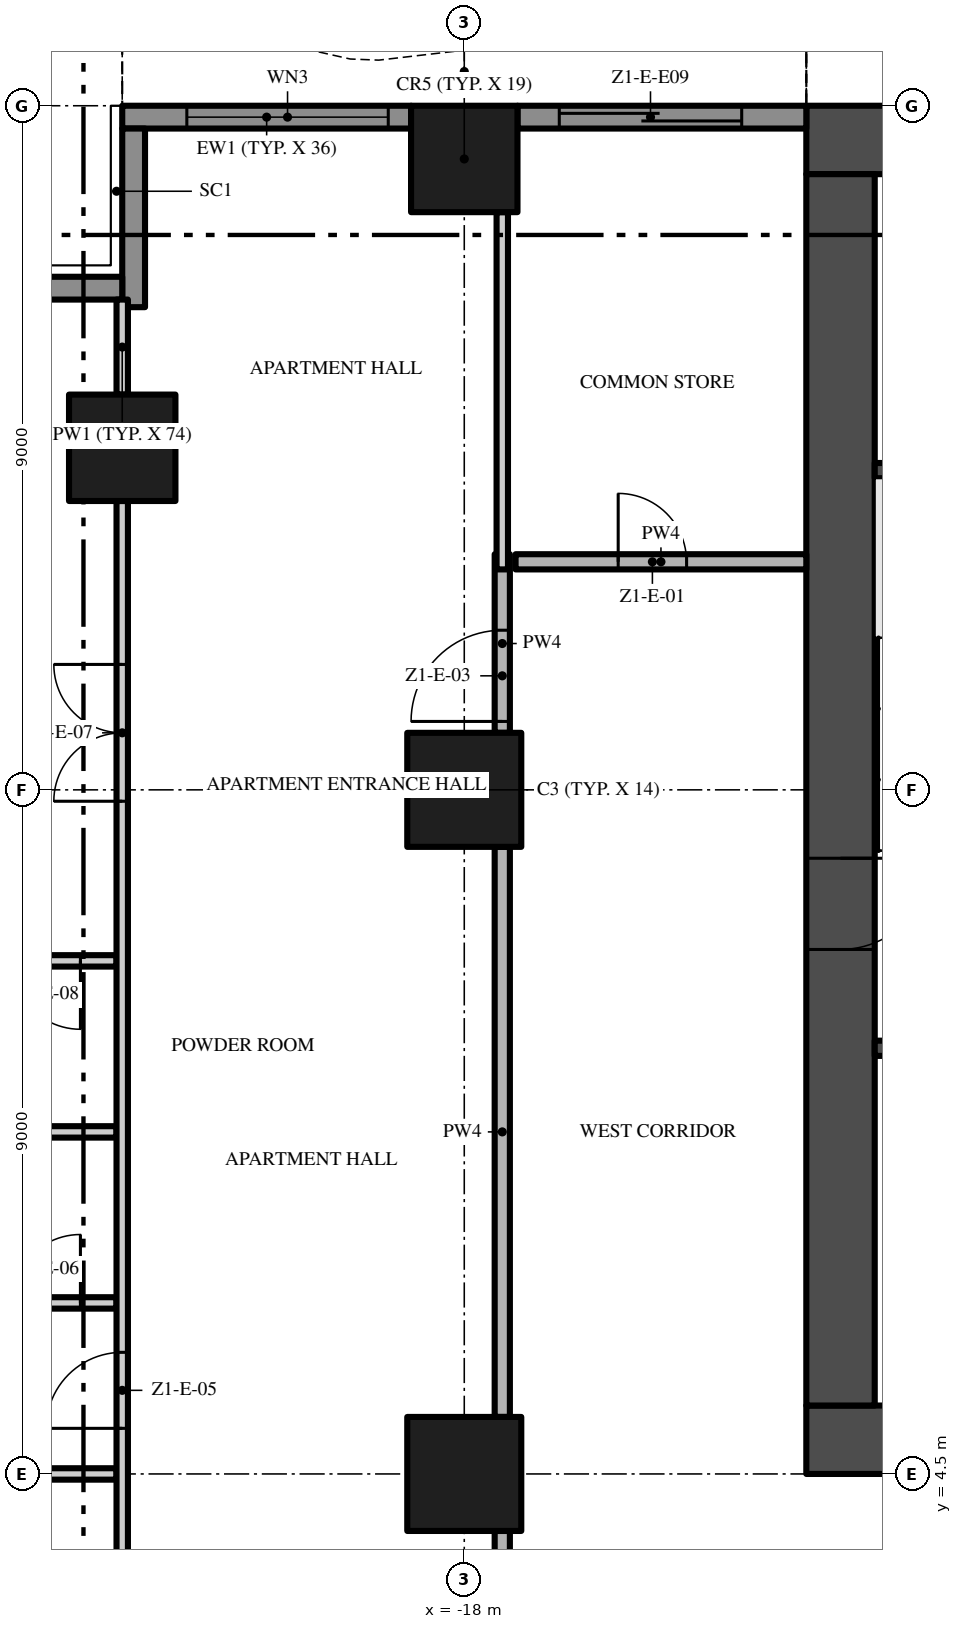
"""IFC4 building model, lengths in metres.
Left out: names, types, materials, properties, quantities, classifications, styles, units other than length and angle.
Written with IfcOpenShell. Run it as: python <this file> out.ifc"""

import sys

from ifc_helpers import new_model, si_unit, direction, frame, frame_2d, origin, origin_2d, place, context, subcontext, project, spatial, polyline, rectangle, outline, extrude, element, fill, save


model = new_model("IFC4")
c1 = context("Model", 3, precision=1e-05, world=origin(), true_north=direction((0.0, 1.0)))
c2 = subcontext(c1, "Body", "Model", "MODEL_VIEW")
j1 = project(units=[si_unit("LENGTHUNIT", "METRE"), si_unit("PLANEANGLEUNIT", "RADIAN")], contexts=[c1])
p1 = place(None, origin())
s1 = spatial("IfcSite", under=j1, at=p1, CompositionType="ELEMENT")
p2 = place(p1, origin())
s2 = spatial("IfcBuilding", under=s1, at=p2, CompositionType="ELEMENT")
p3 = place(p2, frame((0.0, 0.0, 56.8)))
s3 = spatial("IfcBuildingStorey", under=s2, at=p3, CompositionType="ELEMENT", Elevation=56.8)
p4 = place(p3, frame((-13.5, 4.95, -0.3), z_axis=(0.0, 0.0, 1.0), x_axis=(1.0, 0.0, 0.0)))
e1 = element("IfcWall", 1, at=p4, inside=s3, PredefinedType="SHEAR", context=c2, shape_type="SweptSolid", body=[
    extrude(rectangle(XDim=27.0, YDim=0.9, at=frame_2d((13.5, 0.0))), origin(), (0.0, 0.0, 1.0), 3.8),
])
p5 = place(p4, frame((12.0, 0.0, 0.3)))
e2 = element("IfcOpeningElement", 2, at=p5, cuts=e1, PredefinedType="OPENING", context=c2, shape_type="SweptSolid", body=[
    extrude(rectangle(XDim=3.0, YDim=2.4, at=frame_2d((1.5, 1.2))), frame((0.0, 0.46, 0.0), z_axis=(0.0, -1.0, 0.0), x_axis=(1.0, 0.0, 0.0)), (0.0, 0.0, 1.0), 0.92),
])
p6 = place(p4, frame((4.9, 0.0, 0.3)))
e3 = element("IfcOpeningElement", 3, at=p6, cuts=e1, PredefinedType="OPENING", context=c2, shape_type="SweptSolid", body=[
    extrude(rectangle(XDim=1.2, YDim=2.2, at=frame_2d((0.6, 1.1))), frame((0.0, 0.46, 0.0), z_axis=(0.0, -1.0, 0.0), x_axis=(1.0, 0.0, 0.0)), (0.0, 0.0, 1.0), 0.92),
])
p7 = place(p4, frame((20.75, 0.0, 0.3)))
e4 = element("IfcOpeningElement", 4, at=p7, cuts=e1, PredefinedType="OPENING", context=c2, shape_type="SweptSolid", body=[
    extrude(rectangle(XDim=1.5, YDim=2.2, at=frame_2d((0.75, 1.1))), frame((0.0, 0.46, 0.0), z_axis=(0.0, -1.0, 0.0), x_axis=(1.0, 0.0, 0.0)), (0.0, 0.0, 1.0), 0.92),
])
p8 = place(p4, frame((17.4, 0.0, 0.3)))
e5 = element("IfcOpeningElement", 5, at=p8, cuts=e1, PredefinedType="OPENING", context=c2, shape_type="SweptSolid", body=[
    extrude(rectangle(XDim=1.2, YDim=2.2, at=frame_2d((0.6, 1.1))), frame((0.0, 0.46, 0.0), z_axis=(0.0, -1.0, 0.0), x_axis=(1.0, 0.0, 0.0)), (0.0, 0.0, 1.0), 0.92),
])
p9 = place(p3, frame((13.5, 22.05, -0.3), z_axis=(0.0, 0.0, 1.0), x_axis=(-1.0, 0.0, 0.0)))
e6 = element("IfcWall", 6, at=p9, inside=s3, PredefinedType="SHEAR", context=c2, shape_type="SweptSolid", body=[
    extrude(rectangle(XDim=27.0, YDim=0.9, at=frame_2d((13.5, 0.0))), origin(), (0.0, 0.0, 1.0), 3.8),
])
p10 = place(p3, frame((-13.05, 21.6, -0.3), z_axis=(0.0, 0.0, 1.0), x_axis=(0.0, -1.0, 0.0)))
e7 = element("IfcWall", 7, at=p10, inside=s3, PredefinedType="SHEAR", context=c2, shape_type="SweptSolid", body=[
    extrude(rectangle(XDim=16.2, YDim=0.9, at=frame_2d((8.1, 0.0))), origin(), (0.0, 0.0, 1.0), 3.8),
])
p11 = place(p10, frame((9.0, 0.0, 0.3)))
e8 = element("IfcOpeningElement", 8, at=p11, cuts=e7, PredefinedType="OPENING", context=c2, shape_type="SweptSolid", body=[
    extrude(rectangle(XDim=1.2, YDim=2.2, at=frame_2d((0.6, 1.1))), frame((0.0, 0.46, 0.0), z_axis=(0.0, -1.0, 0.0), x_axis=(1.0, 0.0, 0.0)), (0.0, 0.0, 1.0), 0.92),
])
p12 = place(p3, frame((-18.0, 13.5, 0.0), z_axis=(0.0, 0.0, 1.0), x_axis=(1.0, 0.0, 0.0)))
e9 = element("IfcColumn", 9, at=p12, inside=s3, PredefinedType="COLUMN", context=c2, shape_type="SweptSolid", body=[
    extrude(rectangle(XDim=1.5, YDim=1.5, at=origin_2d()), origin(), (0.0, 0.0, 1.0), 3.5),
])
p13 = place(p3, frame((-18.0, 21.8, 0.0), z_axis=(0.0, 0.0, 1.0), x_axis=(1.0, 0.0, 0.0)))
e10 = element("IfcColumn", 10, at=p13, inside=s3, PredefinedType="COLUMN", context=c2, shape_type="SweptSolid", body=[
    extrude(rectangle(XDim=1.4, YDim=1.4, at=origin_2d()), origin(), (0.0, 0.0, 1.0), 3.5),
])
p14 = place(p3, frame((-18.0, 4.5, 0.0), z_axis=(0.0, 0.0, 1.0), x_axis=(1.0, 0.0, 0.0)))
e11 = element("IfcColumn", 11, at=p14, inside=s3, PredefinedType="COLUMN", context=c2, shape_type="SweptSolid", body=[
    extrude(rectangle(XDim=1.5, YDim=1.5, at=origin_2d()), origin(), (0.0, 0.0, 1.0), 3.5),
])
p15 = place(p3, frame((-22.5, 18.0, 0.0), z_axis=(0.0, 0.0, 1.0), x_axis=(1.0, 0.0, 0.0)))
e12 = element("IfcColumn", 12, at=p15, inside=s3, PredefinedType="COLUMN", context=c2, shape_type="SweptSolid", body=[
    extrude(rectangle(XDim=1.4, YDim=1.4, at=origin_2d()), origin(), (0.0, 0.0, 1.0), 3.5),
])
p16 = place(p3, frame((-17.3, 22.35, 0.0), z_axis=(0.0, 0.0, 1.0), x_axis=(1.0, 0.0, 0.0)))
e13 = element("IfcWall", 13, at=p16, inside=s3, PredefinedType="SOLIDWALL", context=c2, shape_type="SweptSolid", body=[
    extrude(rectangle(XDim=3.8, YDim=0.3, at=frame_2d((1.9, 0.0))), origin(), (0.0, 0.0, 1.0), 3.5),
])
p17 = place(p16, frame((0.55, 0.0, 0.0)))
e14 = element("IfcOpeningElement", 14, at=p17, cuts=e13, PredefinedType="OPENING", context=c2, shape_type="SweptSolid", body=[
    extrude(rectangle(XDim=2.4, YDim=2.4, at=frame_2d((1.2, 1.2))), frame((0.0, 0.16, 0.0), z_axis=(0.0, -1.0, 0.0), x_axis=(1.0, 0.0, 0.0)), (0.0, 0.0, 1.0), 0.32),
])
p18 = place(p3, frame((-22.5, 22.35, 0.0), z_axis=(0.0, 0.0, 1.0), x_axis=(1.0, 0.0, 0.0)))
e15 = element("IfcWall", 15, at=p18, inside=s3, PredefinedType="SOLIDWALL", context=c2, shape_type="SweptSolid", body=[
    extrude(rectangle(XDim=3.8, YDim=0.3, at=frame_2d((1.9, 0.0))), origin(), (0.0, 0.0, 1.0), 3.5),
])
p19 = place(p18, frame((0.85, 0.0, 0.45)))
e16 = element("IfcOpeningElement", 16, at=p19, cuts=e15, PredefinedType="OPENING", context=c2, shape_type="SweptSolid", body=[
    extrude(rectangle(XDim=2.65, YDim=2.65, at=frame_2d((1.325, 1.325))), frame((0.0, 0.16, 0.0), z_axis=(0.0, -1.0, 0.0), x_axis=(1.0, 0.0, 0.0)), (0.0, 0.0, 1.0), 0.32),
])
p20 = place(p3, frame((-22.35, 19.85, 0.0), z_axis=(0.0, 0.0, 1.0), x_axis=(0.0, 1.0, 0.0)))
e17 = element("IfcWall", 17, at=p20, inside=s3, PredefinedType="SOLIDWALL", context=c2, shape_type="SweptSolid", body=[
    extrude(rectangle(XDim=2.35, YDim=0.3, at=frame_2d((1.175, 0.0))), origin(), (0.0, 0.0, 1.0), 3.5),
])
p21 = place(p3, frame((-24.75, 20.1, 0.0), z_axis=(0.0, 0.0, 1.0), x_axis=(1.0, 0.0, 0.0)))
e18 = element("IfcWall", 18, at=p21, inside=s3, PredefinedType="SOLIDWALL", context=c2, shape_type="SweptSolid", body=[
    extrude(rectangle(XDim=2.25, YDim=0.3, at=frame_2d((1.125, 0.0))), origin(), (0.0, 0.0, 1.0), 3.5),
])
p22 = place(p3, origin())
e19 = element("IfcWall", 19, at=p22, inside=s3, PredefinedType="USERDEFINED", context=c2, shape_type="SweptSolid", body=[
    extrude(outline(polyline([(-13.5, 25.149), (-15.0, 24.488), (-16.5, 23.755), (-18.0, 23.231), (-19.125, 23.1), (-19.5, 23.115), (-21.0, 23.451), (-22.5, 24.112), (-22.601, 23.883), (-21.079, 23.213), (-19.533, 22.866), (-19.115, 22.849), (-17.944, 22.986), (-16.404, 23.524), (-14.895, 24.261), (-13.399, 24.92), (-13.5, 25.149)])), origin(), (0.0, 0.0, 1.0), 0.9),
])
for number, where, z_axis, x_axis in (
    (20, (-12.6, 10.1, 0.0), (0.0, 0.0, 1.0), (1.0, 0.0, 0.0)),
    (21, (-12.6, 17.7, 0.0), (0.0, 0.0, 1.0), (1.0, 0.0, 0.0)),
):
    element("IfcWall", number, at=place(p3, frame(where, z_axis=z_axis, x_axis=x_axis)), inside=s3, PredefinedType="SHEAR", context=c2, shape_type="SweptSolid", body=[
        extrude(rectangle(XDim=2.95, YDim=0.2, at=frame_2d((1.475, 0.0))), origin(), (0.0, 0.0, 1.0), 3.5),
    ])
p23 = place(p3, frame((-25.6, 4.5, 0.0), z_axis=(0.0, 0.0, 1.0), x_axis=(1.0, 0.0, 0.0)))
e22 = element("IfcWall", 22, at=p23, inside=s3, PredefinedType="PARTITIONING", context=c2, shape_type="SweptSolid", body=[
    extrude(rectangle(XDim=3.025, YDim=0.15, at=frame_2d((1.512, 0.0))), origin(), (0.0, 0.0, 1.0), 3.5),
])
p24 = place(p3, frame((-24.45, 6.75, 0.0), z_axis=(0.0, 0.0, 1.0), x_axis=(1.0, 0.0, 0.0)))
e23 = element("IfcWall", 23, at=p24, inside=s3, PredefinedType="PARTITIONING", context=c2, shape_type="SweptSolid", body=[
    extrude(rectangle(XDim=1.875, YDim=0.15, at=frame_2d((0.938, 0.0))), origin(), (0.0, 0.0, 1.0), 3.5),
])
p25 = place(p24, frame((0.5, 0.0, 0.0)))
e24 = element("IfcOpeningElement", 24, at=p25, cuts=e23, PredefinedType="OPENING", context=c2, shape_type="SweptSolid", body=[
    extrude(rectangle(XDim=0.9, YDim=2.1, at=frame_2d((0.45, 1.05))), frame((0.0, 0.085, 0.0), z_axis=(0.0, -1.0, 0.0), x_axis=(1.0, 0.0, 0.0)), (0.0, 0.0, 1.0), 0.17),
])
p26 = place(p3, frame((-24.45, 9.0, 0.0), z_axis=(0.0, 0.0, 1.0), x_axis=(1.0, 0.0, 0.0)))
e25 = element("IfcWall", 25, at=p26, inside=s3, PredefinedType="PARTITIONING", context=c2, shape_type="SweptSolid", body=[
    extrude(rectangle(XDim=1.875, YDim=0.15, at=frame_2d((0.938, 0.0))), origin(), (0.0, 0.0, 1.0), 3.5),
])
p27 = place(p3, frame((-22.575, 11.25, 0.0), z_axis=(0.0, 0.0, 1.0), x_axis=(-1.0, 0.0, 0.0)))
e26 = element("IfcWall", 26, at=p27, inside=s3, PredefinedType="PARTITIONING", context=c2, shape_type="SweptSolid", body=[
    extrude(rectangle(XDim=1.875, YDim=0.15, at=frame_2d((0.938, 0.0))), origin(), (0.0, 0.0, 1.0), 3.5),
])
p28 = place(p27, frame((0.475, 0.0, 0.0)))
e27 = element("IfcOpeningElement", 27, at=p28, cuts=e26, PredefinedType="OPENING", context=c2, shape_type="SweptSolid", body=[
    extrude(rectangle(XDim=0.9, YDim=2.1, at=frame_2d((0.45, 1.05))), frame((0.0, 0.085, 0.0), z_axis=(0.0, -1.0, 0.0), x_axis=(1.0, 0.0, 0.0)), (0.0, 0.0, 1.0), 0.17),
])
p29 = place(p3, frame((-17.325, 16.5, 0.0), z_axis=(0.0, 0.0, 1.0), x_axis=(1.0, 0.0, 0.0)))
e28 = element("IfcWall", 28, at=p29, inside=s3, PredefinedType="PARTITIONING", context=c2, shape_type="SweptSolid", body=[
    extrude(rectangle(XDim=3.825, YDim=0.2, at=frame_2d((1.913, 0.0))), origin(), (0.0, 0.0, 1.0), 3.5),
])
p30 = place(p29, frame((1.35, 0.0, 0.0)))
e29 = element("IfcOpeningElement", 29, at=p30, cuts=e28, PredefinedType="OPENING", context=c2, shape_type="SweptSolid", body=[
    extrude(rectangle(XDim=0.9, YDim=2.1, at=frame_2d((0.45, 1.05))), frame((0.0, 0.11, 0.0), z_axis=(0.0, -1.0, 0.0), x_axis=(1.0, 0.0, 0.0)), (0.0, 0.0, 1.0), 0.22),
])
p31 = place(p3, frame((-22.5, 0.1, 0.0), z_axis=(0.0, 0.0, 1.0), x_axis=(0.0, 1.0, 0.0)))
e30 = element("IfcWall", 30, at=p31, inside=s3, PredefinedType="PARTITIONING", context=c2, shape_type="SweptSolid", body=[
    extrude(rectangle(XDim=17.2, YDim=0.15, at=frame_2d((8.6, 0.0))), origin(), (0.0, 0.0, 1.0), 3.5),
])
p32 = place(p31, frame((1.65, 0.0, 0.0)))
e31 = element("IfcOpeningElement", 31, at=p32, cuts=e30, PredefinedType="OPENING", context=c2, shape_type="SweptSolid", body=[
    extrude(rectangle(XDim=1.0, YDim=2.4, at=frame_2d((0.5, 1.2))), frame((0.0, 0.085, 0.0), z_axis=(0.0, -1.0, 0.0), x_axis=(1.0, 0.0, 0.0)), (0.0, 0.0, 1.0), 0.17),
])
p33 = place(p31, frame((5.0, 0.0, 0.0)))
e32 = element("IfcOpeningElement", 32, at=p33, cuts=e30, PredefinedType="OPENING", context=c2, shape_type="SweptSolid", body=[
    extrude(rectangle(XDim=1.0, YDim=2.4, at=frame_2d((0.5, 1.2))), frame((0.0, 0.085, 0.0), z_axis=(0.0, -1.0, 0.0), x_axis=(1.0, 0.0, 0.0)), (0.0, 0.0, 1.0), 0.17),
])
p34 = place(p31, frame((13.25, 0.0, 0.0)))
e33 = element("IfcOpeningElement", 33, at=p34, cuts=e30, PredefinedType="OPENING", context=c2, shape_type="SweptSolid", body=[
    extrude(rectangle(XDim=1.8, YDim=2.4, at=frame_2d((0.9, 1.2))), frame((0.0, 0.085, 0.0), z_axis=(0.0, -1.0, 0.0), x_axis=(1.0, 0.0, 0.0)), (0.0, 0.0, 1.0), 0.17),
])
p35 = place(p3, frame((-22.5, 18.7, 0.0), z_axis=(0.0, 0.0, 1.0), x_axis=(0.0, 1.0, 0.0)))
e34 = element("IfcWall", 34, at=p35, inside=s3, PredefinedType="PARTITIONING", context=c2, shape_type="SweptSolid", body=[
    extrude(rectangle(XDim=1.25, YDim=0.15, at=frame_2d((0.625, 0.0))), origin(), (0.0, 0.0, 1.0), 3.5),
])
p36 = place(p3, frame((-17.5, -0.2, 0.0), z_axis=(0.0, 0.0, 1.0), x_axis=(0.0, 1.0, 0.0)))
e35 = element("IfcWall", 35, at=p36, inside=s3, PredefinedType="PARTITIONING", context=c2, shape_type="SweptSolid", body=[
    extrude(rectangle(XDim=3.95, YDim=0.2, at=frame_2d((1.975, 0.0))), origin(), (0.0, 0.0, 1.0), 3.5),
])
p37 = place(p3, frame((-17.5, 5.25, 0.0), z_axis=(0.0, 0.0, 1.0), x_axis=(0.0, 1.0, 0.0)))
e36 = element("IfcWall", 36, at=p37, inside=s3, PredefinedType="PARTITIONING", context=c2, shape_type="SweptSolid", body=[
    extrude(rectangle(XDim=7.5, YDim=0.2, at=frame_2d((3.75, 0.0))), origin(), (0.0, 0.0, 1.0), 3.5),
])
p38 = place(p3, frame((-17.5, 14.25, 0.0), z_axis=(0.0, 0.0, 1.0), x_axis=(0.0, 1.0, 0.0)))
e37 = element("IfcWall", 37, at=p38, inside=s3, PredefinedType="PARTITIONING", context=c2, shape_type="SweptSolid", body=[
    extrude(rectangle(XDim=2.35, YDim=0.2, at=frame_2d((1.175, 0.0))), origin(), (0.0, 0.0, 1.0), 3.5),
])
p39 = place(p38, frame((0.15, 0.0, 0.0)))
e38 = element("IfcOpeningElement", 38, at=p39, cuts=e37, PredefinedType="OPENING", context=c2, shape_type="SweptSolid", body=[
    extrude(rectangle(XDim=1.2, YDim=2.4, at=frame_2d((0.6, 1.2))), frame((0.0, 0.11, 0.0), z_axis=(0.0, -1.0, 0.0), x_axis=(1.0, 0.0, 0.0)), (0.0, 0.0, 1.0), 0.22),
])
p40 = place(p3, frame((-17.5, 16.4, 0.0), z_axis=(0.0, 0.0, 1.0), x_axis=(0.0, 1.0, 0.0)))
e39 = element("IfcWall", 39, at=p40, inside=s3, PredefinedType="PARTITIONING", context=c2, shape_type="SweptSolid", body=[
    extrude(rectangle(XDim=4.7, YDim=0.15, at=frame_2d((2.35, 0.0))), origin(), (0.0, 0.0, 1.0), 3.5),
])
p41 = place(p17, origin())
e40 = element("IfcDoor", 40, at=p41, inside=s3, OperationType="SINGLE_SWING_LEFT", PredefinedType="DOOR", context=c2, shape_type="SweptSolid", body=[
    extrude(rectangle(XDim=2.4, YDim=2.4, at=frame_2d((1.2, 1.2))), frame((0.0, 0.025, 0.0), z_axis=(0.0, -1.0, 0.0), x_axis=(1.0, 0.0, 0.0)), (0.0, 0.0, 1.0), 0.05),
])
fill(e14, e40)
p42 = place(p19, origin())
e41 = element("IfcWindow", 41, at=p42, inside=s3, PartitioningType="SINGLE_PANEL", PredefinedType="WINDOW", context=c2, shape_type="SweptSolid", body=[
    extrude(rectangle(XDim=2.65, YDim=2.65, at=frame_2d((1.325, 1.325))), frame((0.0, 0.03, 0.0), z_axis=(0.0, -1.0, 0.0), x_axis=(1.0, 0.0, 0.0)), (0.0, 0.0, 1.0), 0.06),
])
fill(e16, e41)
p43 = place(p11, frame((1.2, 0.0, 0.0), z_axis=(0.0, 0.0, 1.0), x_axis=(-1.0, 0.0, 0.0)))
e42 = element("IfcDoor", 42, at=p43, inside=s3, OperationType="SINGLE_SWING_RIGHT", PredefinedType="DOOR", context=c2, shape_type="SweptSolid", body=[
    extrude(rectangle(XDim=1.2, YDim=2.2, at=frame_2d((0.6, 1.1))), frame((0.0, 0.025, 0.0), z_axis=(0.0, -1.0, 0.0), x_axis=(1.0, 0.0, 0.0)), (0.0, 0.0, 1.0), 0.05),
])
fill(e8, e42)
p44 = place(p30, origin())
e43 = element("IfcDoor", 43, at=p44, inside=s3, OperationType="SINGLE_SWING_LEFT", PredefinedType="DOOR", context=c2, shape_type="SweptSolid", body=[
    extrude(rectangle(XDim=0.9, YDim=2.1, at=frame_2d((0.45, 1.05))), frame((0.0, 0.025, 0.0), z_axis=(0.0, -1.0, 0.0), x_axis=(1.0, 0.0, 0.0)), (0.0, 0.0, 1.0), 0.05),
])
fill(e29, e43)
p45 = place(p39, origin())
e44 = element("IfcDoor", 44, at=p45, inside=s3, OperationType="SINGLE_SWING_LEFT", PredefinedType="DOOR", context=c2, shape_type="SweptSolid", body=[
    extrude(rectangle(XDim=1.2, YDim=2.4, at=frame_2d((0.6, 1.2))), frame((0.0, 0.025, 0.0), z_axis=(0.0, -1.0, 0.0), x_axis=(1.0, 0.0, 0.0)), (0.0, 0.0, 1.0), 0.05),
])
fill(e38, e44)
p46 = place(p33, origin())
e45 = element("IfcDoor", 45, at=p46, inside=s3, OperationType="SINGLE_SWING_LEFT", PredefinedType="DOOR", context=c2, shape_type="SweptSolid", body=[
    extrude(rectangle(XDim=1.0, YDim=2.4, at=frame_2d((0.5, 1.2))), frame((0.0, 0.025, 0.0), z_axis=(0.0, -1.0, 0.0), x_axis=(1.0, 0.0, 0.0)), (0.0, 0.0, 1.0), 0.05),
])
fill(e32, e45)
p47 = place(p25, origin())
e46 = element("IfcDoor", 46, at=p47, inside=s3, OperationType="SINGLE_SWING_RIGHT", PredefinedType="DOOR", context=c2, shape_type="SweptSolid", body=[
    extrude(rectangle(XDim=0.9, YDim=2.1, at=frame_2d((0.45, 1.05))), frame((0.0, 0.025, 0.0), z_axis=(0.0, -1.0, 0.0), x_axis=(1.0, 0.0, 0.0)), (0.0, 0.0, 1.0), 0.05),
])
fill(e24, e46)
p48 = place(p34, origin())
e47 = element("IfcDoor", 47, at=p48, inside=s3, OperationType="DOUBLE_DOOR_SINGLE_SWING", PredefinedType="DOOR", context=c2, shape_type="SweptSolid", body=[
    extrude(rectangle(XDim=1.8, YDim=2.4, at=frame_2d((0.9, 1.2))), frame((0.0, 0.025, 0.0), z_axis=(0.0, -1.0, 0.0), x_axis=(1.0, 0.0, 0.0)), (0.0, 0.0, 1.0), 0.05),
])
fill(e33, e47)
p49 = place(p28, origin())
e48 = element("IfcDoor", 48, at=p49, inside=s3, OperationType="SINGLE_SWING_LEFT", PredefinedType="DOOR", context=c2, shape_type="SweptSolid", body=[
    extrude(rectangle(XDim=0.9, YDim=2.1, at=frame_2d((0.45, 1.05))), frame((0.0, 0.025, 0.0), z_axis=(0.0, -1.0, 0.0), x_axis=(1.0, 0.0, 0.0)), (0.0, 0.0, 1.0), 0.05),
])
fill(e27, e48)
save(model, sys.argv[1])
